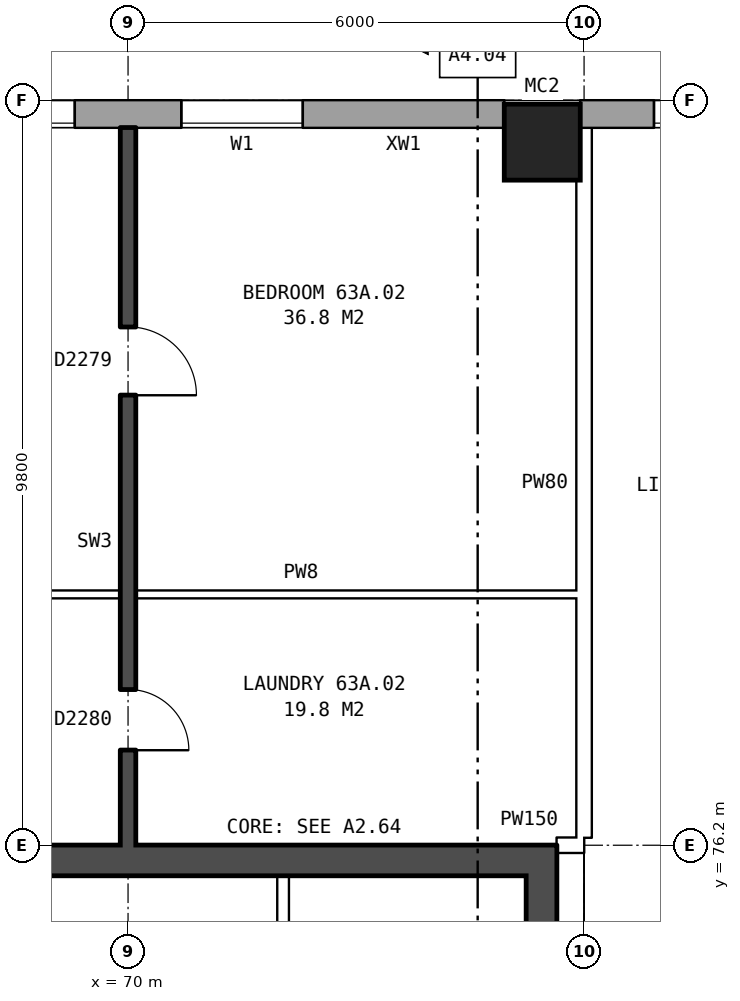
"""IFC4 building model, lengths in metres.
Left out: names, types, materials, properties, quantities, classifications, styles, units other than length and angle.
Written with IfcOpenShell. Run it as: python <this file> out.ifc"""

import sys

from ifc_helpers import new_model, si_unit, direction, frame, frame_2d, origin, origin_2d, place, context, subcontext, project, spatial, rectangle, hollow_rectangle, extrude, element, fill, save


model = new_model("IFC4")
c1 = context("Model", 3, precision=1e-05, world=origin(), true_north=direction((0.0, 1.0)))
c2 = subcontext(c1, "Body", "Model", "MODEL_VIEW")
j1 = project(units=[si_unit("LENGTHUNIT", "METRE"), si_unit("PLANEANGLEUNIT", "RADIAN")], contexts=[c1])
p1 = place(None, origin())
s1 = spatial("IfcSite", under=j1, at=p1, CompositionType="ELEMENT")
p2 = place(p1, origin())
s2 = spatial("IfcBuilding", under=s1, at=p2, CompositionType="ELEMENT")
p3 = place(p2, frame((0.0, 0.0, 224.5)))
s3 = spatial("IfcBuildingStorey", under=s2, at=p3, CompositionType="ELEMENT", Elevation=224.5)
p4 = place(p3, frame((75.45, 85.45, 0.0), z_axis=(0.0, 0.0, 1.0), x_axis=(1.0, 0.0, 0.0)))
e1 = element("IfcColumn", 1, at=p4, inside=s3, PredefinedType="COLUMN", context=c2, shape_type="SweptSolid", body=[
    extrude(hollow_rectangle(XDim=1.0, YDim=1.0, WallThickness=0.055, at=origin_2d()), origin(), (0.0, 0.0, 1.0), 3.1),
])
p5 = place(p3, frame((131.05, 85.82, 0.0), z_axis=(0.0, 0.0, 1.0), x_axis=(-1.0, 0.0, 0.0)))
e2 = element("IfcWall", 2, at=p5, inside=s3, PredefinedType="STANDARD", context=c2, shape_type="SweptSolid", body=[
    extrude(rectangle(XDim=55.1, YDim=0.36, at=frame_2d((27.55, 0.0))), origin(), (0.0, 0.0, 1.0), 2.85),
])
p6 = place(p5, frame((0.969, 0.0, 0.8)))
e3 = element("IfcOpeningElement", 3, at=p6, cuts=e2, PredefinedType="OPENING", context=c2, shape_type="SweptSolid", body=[
    extrude(rectangle(XDim=1.6, YDim=1.8, at=frame_2d((0.8, 0.9))), frame((0.0, 0.19, 0.0), z_axis=(0.0, -1.0, 0.0), x_axis=(1.0, 0.0, 0.0)), (0.0, 0.0, 1.0), 0.38),
])
p7 = place(p5, frame((4.406, 0.0, 0.8)))
e4 = element("IfcOpeningElement", 4, at=p7, cuts=e2, PredefinedType="OPENING", context=c2, shape_type="SweptSolid", body=[
    extrude(rectangle(XDim=1.6, YDim=1.8, at=frame_2d((0.8, 0.9))), frame((0.0, 0.19, 0.0), z_axis=(0.0, -1.0, 0.0), x_axis=(1.0, 0.0, 0.0)), (0.0, 0.0, 1.0), 0.38),
])
p8 = place(p5, frame((7.844, 0.0, 0.8)))
e5 = element("IfcOpeningElement", 5, at=p8, cuts=e2, PredefinedType="OPENING", context=c2, shape_type="SweptSolid", body=[
    extrude(rectangle(XDim=1.6, YDim=1.8, at=frame_2d((0.8, 0.9))), frame((0.0, 0.19, 0.0), z_axis=(0.0, -1.0, 0.0), x_axis=(1.0, 0.0, 0.0)), (0.0, 0.0, 1.0), 0.38),
])
p9 = place(p5, frame((11.281, 0.0, 0.8)))
e6 = element("IfcOpeningElement", 6, at=p9, cuts=e2, PredefinedType="OPENING", context=c2, shape_type="SweptSolid", body=[
    extrude(rectangle(XDim=1.6, YDim=1.8, at=frame_2d((0.8, 0.9))), frame((0.0, 0.19, 0.0), z_axis=(0.0, -1.0, 0.0), x_axis=(1.0, 0.0, 0.0)), (0.0, 0.0, 1.0), 0.38),
])
p10 = place(p5, frame((14.719, 0.0, 0.8)))
e7 = element("IfcOpeningElement", 7, at=p10, cuts=e2, PredefinedType="OPENING", context=c2, shape_type="SweptSolid", body=[
    extrude(rectangle(XDim=1.6, YDim=1.8, at=frame_2d((0.8, 0.9))), frame((0.0, 0.19, 0.0), z_axis=(0.0, -1.0, 0.0), x_axis=(1.0, 0.0, 0.0)), (0.0, 0.0, 1.0), 0.38),
])
p11 = place(p5, frame((18.156, 0.0, 0.8)))
e8 = element("IfcOpeningElement", 8, at=p11, cuts=e2, PredefinedType="OPENING", context=c2, shape_type="SweptSolid", body=[
    extrude(rectangle(XDim=1.6, YDim=1.8, at=frame_2d((0.8, 0.9))), frame((0.0, 0.19, 0.0), z_axis=(0.0, -1.0, 0.0), x_axis=(1.0, 0.0, 0.0)), (0.0, 0.0, 1.0), 0.38),
])
p12 = place(p5, frame((21.594, 0.0, 0.8)))
e9 = element("IfcOpeningElement", 9, at=p12, cuts=e2, PredefinedType="OPENING", context=c2, shape_type="SweptSolid", body=[
    extrude(rectangle(XDim=1.6, YDim=1.8, at=frame_2d((0.8, 0.9))), frame((0.0, 0.19, 0.0), z_axis=(0.0, -1.0, 0.0), x_axis=(1.0, 0.0, 0.0)), (0.0, 0.0, 1.0), 0.38),
])
p13 = place(p5, frame((25.031, 0.0, 0.8)))
e10 = element("IfcOpeningElement", 10, at=p13, cuts=e2, PredefinedType="OPENING", context=c2, shape_type="SweptSolid", body=[
    extrude(rectangle(XDim=1.6, YDim=1.8, at=frame_2d((0.8, 0.9))), frame((0.0, 0.19, 0.0), z_axis=(0.0, -1.0, 0.0), x_axis=(1.0, 0.0, 0.0)), (0.0, 0.0, 1.0), 0.38),
])
p14 = place(p5, frame((28.469, 0.0, 0.8)))
e11 = element("IfcOpeningElement", 11, at=p14, cuts=e2, PredefinedType="OPENING", context=c2, shape_type="SweptSolid", body=[
    extrude(rectangle(XDim=1.6, YDim=1.8, at=frame_2d((0.8, 0.9))), frame((0.0, 0.19, 0.0), z_axis=(0.0, -1.0, 0.0), x_axis=(1.0, 0.0, 0.0)), (0.0, 0.0, 1.0), 0.38),
])
p15 = place(p5, frame((31.906, 0.0, 0.8)))
e12 = element("IfcOpeningElement", 12, at=p15, cuts=e2, PredefinedType="OPENING", context=c2, shape_type="SweptSolid", body=[
    extrude(rectangle(XDim=1.6, YDim=1.8, at=frame_2d((0.8, 0.9))), frame((0.0, 0.19, 0.0), z_axis=(0.0, -1.0, 0.0), x_axis=(1.0, 0.0, 0.0)), (0.0, 0.0, 1.0), 0.38),
])
p16 = place(p5, frame((35.344, 0.0, 0.8)))
e13 = element("IfcOpeningElement", 13, at=p16, cuts=e2, PredefinedType="OPENING", context=c2, shape_type="SweptSolid", body=[
    extrude(rectangle(XDim=1.6, YDim=1.8, at=frame_2d((0.8, 0.9))), frame((0.0, 0.19, 0.0), z_axis=(0.0, -1.0, 0.0), x_axis=(1.0, 0.0, 0.0)), (0.0, 0.0, 1.0), 0.38),
])
p17 = place(p5, frame((38.781, 0.0, 0.8)))
e14 = element("IfcOpeningElement", 14, at=p17, cuts=e2, PredefinedType="OPENING", context=c2, shape_type="SweptSolid", body=[
    extrude(rectangle(XDim=1.6, YDim=1.8, at=frame_2d((0.8, 0.9))), frame((0.0, 0.19, 0.0), z_axis=(0.0, -1.0, 0.0), x_axis=(1.0, 0.0, 0.0)), (0.0, 0.0, 1.0), 0.38),
])
p18 = place(p5, frame((42.219, 0.0, 0.8)))
e15 = element("IfcOpeningElement", 15, at=p18, cuts=e2, PredefinedType="OPENING", context=c2, shape_type="SweptSolid", body=[
    extrude(rectangle(XDim=1.6, YDim=1.8, at=frame_2d((0.8, 0.9))), frame((0.0, 0.19, 0.0), z_axis=(0.0, -1.0, 0.0), x_axis=(1.0, 0.0, 0.0)), (0.0, 0.0, 1.0), 0.38),
])
p19 = place(p5, frame((45.656, 0.0, 0.8)))
e16 = element("IfcOpeningElement", 16, at=p19, cuts=e2, PredefinedType="OPENING", context=c2, shape_type="SweptSolid", body=[
    extrude(rectangle(XDim=1.6, YDim=1.8, at=frame_2d((0.8, 0.9))), frame((0.0, 0.19, 0.0), z_axis=(0.0, -1.0, 0.0), x_axis=(1.0, 0.0, 0.0)), (0.0, 0.0, 1.0), 0.38),
])
p20 = place(p5, frame((49.094, 0.0, 0.8)))
e17 = element("IfcOpeningElement", 17, at=p20, cuts=e2, PredefinedType="OPENING", context=c2, shape_type="SweptSolid", body=[
    extrude(rectangle(XDim=1.6, YDim=1.8, at=frame_2d((0.8, 0.9))), frame((0.0, 0.19, 0.0), z_axis=(0.0, -1.0, 0.0), x_axis=(1.0, 0.0, 0.0)), (0.0, 0.0, 1.0), 0.38),
])
p21 = place(p5, frame((52.531, 0.0, 0.8)))
e18 = element("IfcOpeningElement", 18, at=p21, cuts=e2, PredefinedType="OPENING", context=c2, shape_type="SweptSolid", body=[
    extrude(rectangle(XDim=1.6, YDim=1.8, at=frame_2d((0.8, 0.9))), frame((0.0, 0.19, 0.0), z_axis=(0.0, -1.0, 0.0), x_axis=(1.0, 0.0, 0.0)), (0.0, 0.0, 1.0), 0.38),
])
p22 = place(p3, frame((74.95, 85.82, 0.0), z_axis=(0.0, 0.0, 1.0), x_axis=(-1.0, 0.0, 0.0)))
e19 = element("IfcWall", 19, at=p22, inside=s3, PredefinedType="STANDARD", context=c2, shape_type="SweptSolid", body=[
    extrude(rectangle(XDim=39.875, YDim=0.36, at=frame_2d((19.938, 0.0))), origin(), (0.0, 0.0, 1.0), 2.85),
])
p23 = place(p22, frame((2.65, 0.0, 0.8)))
e20 = element("IfcOpeningElement", 20, at=p23, cuts=e19, PredefinedType="OPENING", context=c2, shape_type="SweptSolid", body=[
    extrude(rectangle(XDim=1.6, YDim=1.8, at=frame_2d((0.8, 0.9))), frame((0.0, 0.19, 0.0), z_axis=(0.0, -1.0, 0.0), x_axis=(1.0, 0.0, 0.0)), (0.0, 0.0, 1.0), 0.38),
])
p24 = place(p22, frame((5.65, 0.0, 0.8)))
e21 = element("IfcOpeningElement", 21, at=p24, cuts=e19, PredefinedType="OPENING", context=c2, shape_type="SweptSolid", body=[
    extrude(rectangle(XDim=1.6, YDim=1.8, at=frame_2d((0.8, 0.9))), frame((0.0, 0.19, 0.0), z_axis=(0.0, -1.0, 0.0), x_axis=(1.0, 0.0, 0.0)), (0.0, 0.0, 1.0), 0.38),
])
p25 = place(p22, frame((8.65, 0.0, 0.8)))
e22 = element("IfcOpeningElement", 22, at=p25, cuts=e19, PredefinedType="OPENING", context=c2, shape_type="SweptSolid", body=[
    extrude(rectangle(XDim=1.6, YDim=1.8, at=frame_2d((0.8, 0.9))), frame((0.0, 0.19, 0.0), z_axis=(0.0, -1.0, 0.0), x_axis=(1.0, 0.0, 0.0)), (0.0, 0.0, 1.0), 0.38),
])
p26 = place(p22, frame((11.65, 0.0, 0.8)))
e23 = element("IfcOpeningElement", 23, at=p26, cuts=e19, PredefinedType="OPENING", context=c2, shape_type="SweptSolid", body=[
    extrude(rectangle(XDim=1.6, YDim=1.8, at=frame_2d((0.8, 0.9))), frame((0.0, 0.19, 0.0), z_axis=(0.0, -1.0, 0.0), x_axis=(1.0, 0.0, 0.0)), (0.0, 0.0, 1.0), 0.38),
])
p27 = place(p22, frame((15.55, 0.0, 0.8)))
e24 = element("IfcOpeningElement", 24, at=p27, cuts=e19, PredefinedType="OPENING", context=c2, shape_type="SweptSolid", body=[
    extrude(rectangle(XDim=1.2, YDim=1.8, at=frame_2d((0.6, 0.9))), frame((0.0, 0.19, 0.0), z_axis=(0.0, -1.0, 0.0), x_axis=(1.0, 0.0, 0.0)), (0.0, 0.0, 1.0), 0.38),
])
p28 = place(p22, frame((17.65, 0.0, 0.8)))
e25 = element("IfcOpeningElement", 25, at=p28, cuts=e19, PredefinedType="OPENING", context=c2, shape_type="SweptSolid", body=[
    extrude(rectangle(XDim=1.6, YDim=1.8, at=frame_2d((0.8, 0.9))), frame((0.0, 0.19, 0.0), z_axis=(0.0, -1.0, 0.0), x_axis=(1.0, 0.0, 0.0)), (0.0, 0.0, 1.0), 0.38),
])
p29 = place(p22, frame((20.65, 0.0, 0.8)))
e26 = element("IfcOpeningElement", 26, at=p29, cuts=e19, PredefinedType="OPENING", context=c2, shape_type="SweptSolid", body=[
    extrude(rectangle(XDim=1.6, YDim=1.8, at=frame_2d((0.8, 0.9))), frame((0.0, 0.19, 0.0), z_axis=(0.0, -1.0, 0.0), x_axis=(1.0, 0.0, 0.0)), (0.0, 0.0, 1.0), 0.38),
])
p30 = place(p22, frame((23.65, 0.0, 0.8)))
e27 = element("IfcOpeningElement", 27, at=p30, cuts=e19, PredefinedType="OPENING", context=c2, shape_type="SweptSolid", body=[
    extrude(rectangle(XDim=1.6, YDim=1.8, at=frame_2d((0.8, 0.9))), frame((0.0, 0.19, 0.0), z_axis=(0.0, -1.0, 0.0), x_axis=(1.0, 0.0, 0.0)), (0.0, 0.0, 1.0), 0.38),
])
p31 = place(p22, frame((26.1, 0.0, 0.25)))
e28 = element("IfcOpeningElement", 28, at=p31, cuts=e19, PredefinedType="OPENING", context=c2, shape_type="SweptSolid", body=[
    extrude(rectangle(XDim=0.8, YDim=1.5, at=frame_2d((0.4, 0.75))), frame((0.0, 0.19, 0.0), z_axis=(0.0, -1.0, 0.0), x_axis=(1.0, 0.0, 0.0)), (0.0, 0.0, 1.0), 0.38),
])
p32 = place(p22, frame((29.65, 0.0, 0.8)))
e29 = element("IfcOpeningElement", 29, at=p32, cuts=e19, PredefinedType="OPENING", context=c2, shape_type="SweptSolid", body=[
    extrude(rectangle(XDim=1.6, YDim=1.8, at=frame_2d((0.8, 0.9))), frame((0.0, 0.19, 0.0), z_axis=(0.0, -1.0, 0.0), x_axis=(1.0, 0.0, 0.0)), (0.0, 0.0, 1.0), 0.38),
])
p33 = place(p22, frame((32.65, 0.0, 0.8)))
e30 = element("IfcOpeningElement", 30, at=p33, cuts=e19, PredefinedType="OPENING", context=c2, shape_type="SweptSolid", body=[
    extrude(rectangle(XDim=1.6, YDim=1.8, at=frame_2d((0.8, 0.9))), frame((0.0, 0.19, 0.0), z_axis=(0.0, -1.0, 0.0), x_axis=(1.0, 0.0, 0.0)), (0.0, 0.0, 1.0), 0.38),
])
p34 = place(p22, frame((35.65, 0.0, 0.8)))
e31 = element("IfcOpeningElement", 31, at=p34, cuts=e19, PredefinedType="OPENING", context=c2, shape_type="SweptSolid", body=[
    extrude(rectangle(XDim=1.6, YDim=1.8, at=frame_2d((0.8, 0.9))), frame((0.0, 0.19, 0.0), z_axis=(0.0, -1.0, 0.0), x_axis=(1.0, 0.0, 0.0)), (0.0, 0.0, 1.0), 0.38),
])
p35 = place(p22, frame((28.15, 0.0, 1.65)))
e32 = element("IfcOpeningElement", 32, at=p35, cuts=e19, PredefinedType="OPENING", context=c2, shape_type="SweptSolid", body=[
    extrude(rectangle(XDim=0.6, YDim=0.9, at=frame_2d((0.3, 0.45))), frame((0.0, 0.19, 0.0), z_axis=(0.0, -1.0, 0.0), x_axis=(1.0, 0.0, 0.0)), (0.0, 0.0, 1.0), 0.38),
])
p36 = place(p3, frame((75.44, 63.8, 0.0), z_axis=(0.0, 0.0, 1.0), x_axis=(0.0, 1.0, 0.0)))
e33 = element("IfcWall", 33, at=p36, inside=s3, PredefinedType="SHEAR", context=c2, shape_type="SweptSolid", body=[
    extrude(rectangle(XDim=12.4, YDim=0.4, at=frame_2d((6.2, 0.0))), origin(), (0.0, 0.0, 1.0), 2.85),
])
p37 = place(p36, frame((9.8, 0.0, 0.0)))
e34 = element("IfcOpeningElement", 34, at=p37, cuts=e33, PredefinedType="OPENING", context=c2, shape_type="SweptSolid", body=[
    extrude(rectangle(XDim=1.1, YDim=2.1, at=frame_2d((0.55, 1.05))), frame((0.0, 0.21, 0.0), z_axis=(0.0, -1.0, 0.0), x_axis=(1.0, 0.0, 0.0)), (0.0, 0.0, 1.0), 0.42),
])
p38 = place(p3, frame((67.04, 76.0, 0.0), z_axis=(0.0, 0.0, 1.0), x_axis=(1.0, 0.0, 0.0)))
e35 = element("IfcWall", 35, at=p38, inside=s3, PredefinedType="SHEAR", context=c2, shape_type="SweptSolid", body=[
    extrude(rectangle(XDim=8.2, YDim=0.4, at=frame_2d((4.1, 0.0))), origin(), (0.0, 0.0, 1.0), 2.85),
])
p39 = place(p3, frame((72.04, 73.45, 0.0), z_axis=(0.0, 0.0, 1.0), x_axis=(0.0, 1.0, 0.0)))
e36 = element("IfcWall", 36, at=p39, inside=s3, PredefinedType="PARTITIONING", context=c2, shape_type="SweptSolid", body=[
    extrude(rectangle(XDim=2.35, YDim=0.15, at=frame_2d((1.175, 0.0))), origin(), (0.0, 0.0, 1.0), 2.85),
])
p40 = place(p39, frame((0.75, 0.0, 0.0)))
e37 = element("IfcOpeningElement", 37, at=p40, cuts=e36, PredefinedType="OPENING", context=c2, shape_type="SweptSolid", body=[
    extrude(rectangle(XDim=0.85, YDim=2.1, at=frame_2d((0.425, 1.05))), frame((0.0, 0.085, 0.0), z_axis=(0.0, -1.0, 0.0), x_axis=(1.0, 0.0, 0.0)), (0.0, 0.0, 1.0), 0.17),
])
p41 = place(p3, frame((75.64, 76.2, 0.0), z_axis=(0.0, 0.0, 1.0), x_axis=(1.0, 0.0, 0.0)))
e38 = element("IfcWall", 38, at=p41, inside=s3, PredefinedType="PARTITIONING", context=c2, shape_type="SweptSolid", body=[
    extrude(rectangle(XDim=0.36, YDim=0.2, at=frame_2d((0.18, 0.0))), origin(), (0.0, 0.0, 1.0), 2.85),
])
p42 = place(p3, frame((64.1, 79.5, 0.0), z_axis=(0.0, 0.0, 1.0), x_axis=(1.0, 0.0, 0.0)))
e39 = element("IfcWall", 39, at=p42, inside=s3, PredefinedType="PARTITIONING", context=c2, shape_type="SweptSolid", body=[
    extrude(rectangle(XDim=11.8, YDim=0.1, at=frame_2d((5.9, 0.0))), origin(), (0.0, 0.0, 1.0), 2.85),
])
p43 = place(p42, frame((3.65, 0.0, 0.0)))
e40 = element("IfcOpeningElement", 40, at=p43, cuts=e39, PredefinedType="OPENING", context=c2, shape_type="SweptSolid", body=[
    extrude(rectangle(XDim=0.9, YDim=2.1, at=frame_2d((0.45, 1.05))), frame((0.0, 0.06, 0.0), z_axis=(0.0, -1.0, 0.0), x_axis=(1.0, 0.0, 0.0)), (0.0, 0.0, 1.0), 0.12),
])
p44 = place(p42, frame((0.7, 0.0, 0.0)))
e41 = element("IfcOpeningElement", 41, at=p44, cuts=e39, PredefinedType="OPENING", context=c2, shape_type="SweptSolid", body=[
    extrude(rectangle(XDim=0.9, YDim=2.1, at=frame_2d((0.45, 1.05))), frame((0.0, 0.06, 0.0), z_axis=(0.0, -1.0, 0.0), x_axis=(1.0, 0.0, 0.0)), (0.0, 0.0, 1.0), 0.12),
])
p45 = place(p3, frame((70.0, 76.2, 0.0), z_axis=(0.0, 0.0, 1.0), x_axis=(0.0, 1.0, 0.0)))
e42 = element("IfcWall", 42, at=p45, inside=s3, PredefinedType="SOLIDWALL", context=c2, shape_type="SweptSolid", body=[
    extrude(rectangle(XDim=9.44, YDim=0.2, at=frame_2d((4.72, 0.0))), origin(), (0.0, 0.0, 1.0), 2.85),
])
p46 = place(p45, frame((5.92, 0.0, 0.0)))
e43 = element("IfcOpeningElement", 43, at=p46, cuts=e42, PredefinedType="OPENING", context=c2, shape_type="SweptSolid", body=[
    extrude(rectangle(XDim=0.9, YDim=2.1, at=frame_2d((0.45, 1.05))), frame((0.0, 0.11, 0.0), z_axis=(0.0, -1.0, 0.0), x_axis=(1.0, 0.0, 0.0)), (0.0, 0.0, 1.0), 0.22),
])
p47 = place(p45, frame((1.25, 0.0, 0.0)))
e44 = element("IfcOpeningElement", 44, at=p47, cuts=e42, PredefinedType="OPENING", context=c2, shape_type="SweptSolid", body=[
    extrude(rectangle(XDim=0.8, YDim=2.1, at=frame_2d((0.4, 1.05))), frame((0.0, 0.11, 0.0), z_axis=(0.0, -1.0, 0.0), x_axis=(1.0, 0.0, 0.0)), (0.0, 0.0, 1.0), 0.22),
])
p48 = place(p3, frame((76.0, 76.3, 0.0), z_axis=(0.0, 0.0, 1.0), x_axis=(0.0, 1.0, 0.0)))
e45 = element("IfcWall", 45, at=p48, inside=s3, PredefinedType="PARTITIONING", context=c2, shape_type="SweptSolid", body=[
    extrude(rectangle(XDim=9.34, YDim=0.2, at=frame_2d((4.67, 0.0))), origin(), (0.0, 0.0, 1.0), 2.85),
])
p49 = place(p21, origin())
e46 = element("IfcWindow", 46, at=p49, inside=s3, PartitioningType="SINGLE_PANEL", PredefinedType="WINDOW", context=c2, shape_type="SweptSolid", body=[
    extrude(rectangle(XDim=1.6, YDim=1.8, at=frame_2d((0.8, 0.9))), frame((0.0, 0.15, 0.0), z_axis=(0.0, -1.0, 0.0), x_axis=(1.0, 0.0, 0.0)), (0.0, 0.0, 1.0), 0.06),
])
fill(e18, e46)
p50 = place(p23, origin())
e47 = element("IfcWindow", 47, at=p50, inside=s3, PartitioningType="SINGLE_PANEL", PredefinedType="WINDOW", context=c2, shape_type="SweptSolid", body=[
    extrude(rectangle(XDim=1.6, YDim=1.8, at=frame_2d((0.8, 0.9))), frame((0.0, 0.15, 0.0), z_axis=(0.0, -1.0, 0.0), x_axis=(1.0, 0.0, 0.0)), (0.0, 0.0, 1.0), 0.06),
])
fill(e20, e47)
p51 = place(p24, origin())
e48 = element("IfcWindow", 48, at=p51, inside=s3, PartitioningType="SINGLE_PANEL", PredefinedType="WINDOW", context=c2, shape_type="SweptSolid", body=[
    extrude(rectangle(XDim=1.6, YDim=1.8, at=frame_2d((0.8, 0.9))), frame((0.0, 0.15, 0.0), z_axis=(0.0, -1.0, 0.0), x_axis=(1.0, 0.0, 0.0)), (0.0, 0.0, 1.0), 0.06),
])
fill(e21, e48)
p52 = place(p46, frame((0.9, 0.0, 0.0), z_axis=(0.0, 0.0, 1.0), x_axis=(-1.0, 0.0, 0.0)))
e49 = element("IfcDoor", 49, at=p52, inside=s3, OperationType="SINGLE_SWING_RIGHT", PredefinedType="DOOR", context=c2, shape_type="SweptSolid", body=[
    extrude(rectangle(XDim=0.9, YDim=2.1, at=frame_2d((0.45, 1.05))), frame((0.0, 0.025, 0.0), z_axis=(0.0, -1.0, 0.0), x_axis=(1.0, 0.0, 0.0)), (0.0, 0.0, 1.0), 0.05),
])
fill(e43, e49)
p53 = place(p47, frame((0.8, 0.0, 0.0), z_axis=(0.0, 0.0, 1.0), x_axis=(-1.0, 0.0, 0.0)))
e50 = element("IfcDoor", 50, at=p53, inside=s3, OperationType="SINGLE_SWING_RIGHT", PredefinedType="DOOR", context=c2, shape_type="SweptSolid", body=[
    extrude(rectangle(XDim=0.8, YDim=2.1, at=frame_2d((0.4, 1.05))), frame((0.0, 0.025, 0.0), z_axis=(0.0, -1.0, 0.0), x_axis=(1.0, 0.0, 0.0)), (0.0, 0.0, 1.0), 0.05),
])
fill(e44, e50)
save(model, sys.argv[1])
